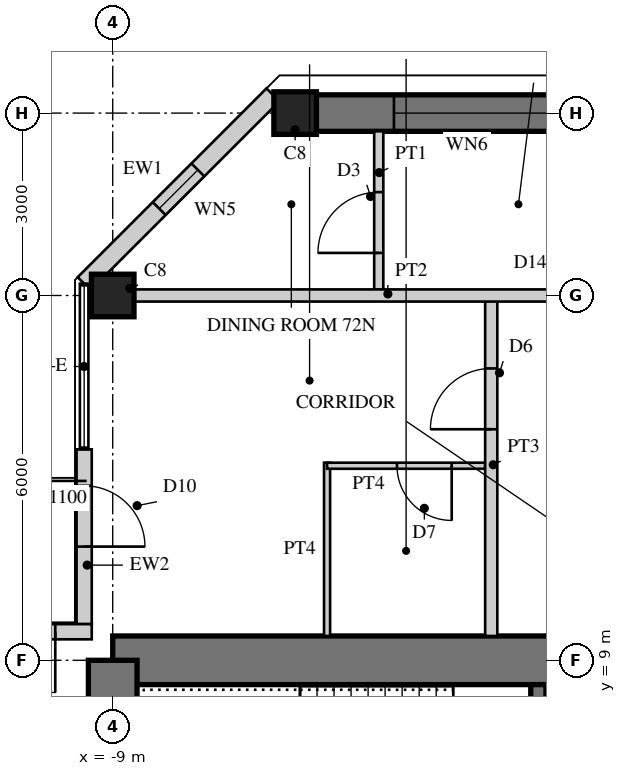
"""IFC4 building model, lengths in metres.
Left out: names, types, materials, properties, quantities, classifications, styles, units other than length and angle.
Written with IfcOpenShell. Run it as: python <this file> out.ifc"""

import sys

from ifc_helpers import new_model, si_unit, direction, frame, frame_2d, origin, origin_2d, place, context, subcontext, project, spatial, rectangle, hollow_rectangle, extrude, element, fill, save


model = new_model("IFC4")
c1 = context("Model", 3, precision=1e-05, world=origin(), true_north=direction((0.0, 1.0)))
c2 = subcontext(c1, "Body", "Model", "MODEL_VIEW")
j1 = project(units=[si_unit("LENGTHUNIT", "METRE"), si_unit("PLANEANGLEUNIT", "RADIAN")], contexts=[c1])
p1 = place(None, origin())
s1 = spatial("IfcSite", under=j1, at=p1, CompositionType="ELEMENT")
p2 = place(p1, origin())
s2 = spatial("IfcBuilding", under=s1, at=p2, CompositionType="ELEMENT")
p3 = place(p2, frame((0.0, 0.0, 278.1)))
s3 = spatial("IfcBuildingStorey", under=s2, at=p3, CompositionType="ELEMENT", Elevation=278.1)
p4 = place(p3, frame((9.0, 9.0, 0.0), z_axis=(0.0, 0.0, 1.0), x_axis=(-1.0, 0.0, 0.0)))
e1 = element("IfcWall", 1, at=p4, inside=s3, PredefinedType="SHEAR", context=c2, shape_type="SweptSolid", body=[
    extrude(rectangle(XDim=18.0, YDim=0.8, at=frame_2d((9.0, 0.0))), origin(), (0.0, 0.0, 1.0), 3.4),
])
p5 = place(p4, frame((9.8, 0.0, 0.0)))
e2 = element("IfcOpeningElement", 2, at=p5, cuts=e1, PredefinedType="OPENING", context=c2, shape_type="SweptSolid", body=[
    extrude(rectangle(XDim=1.0, YDim=2.4, at=frame_2d((0.5, 1.2))), frame((0.0, 0.41, 0.0), z_axis=(0.0, -1.0, 0.0), x_axis=(1.0, 0.0, 0.0)), (0.0, 0.0, 1.0), 0.82),
])
p6 = place(p3, frame((-9.0, 9.0, 0.0), z_axis=(0.0, 0.0, 1.0), x_axis=(0.0, -1.0, 0.0)))
e3 = element("IfcWall", 3, at=p6, inside=s3, PredefinedType="SHEAR", context=c2, shape_type="SweptSolid", body=[
    extrude(rectangle(XDim=18.0, YDim=0.8, at=frame_2d((9.0, 0.0))), origin(), (0.0, 0.0, 1.0), 3.4),
])
p7 = place(p6, frame((9.8, 0.0, 0.0)))
e4 = element("IfcOpeningElement", 4, at=p7, cuts=e3, PredefinedType="OPENING", context=c2, shape_type="SweptSolid", body=[
    extrude(rectangle(XDim=1.0, YDim=2.4, at=frame_2d((0.5, 1.2))), frame((0.0, 0.41, 0.0), z_axis=(0.0, -1.0, 0.0), x_axis=(1.0, 0.0, 0.0)), (0.0, 0.0, 1.0), 0.82),
])
p8 = place(p3, frame((-2.0, 1.675, 0.0), z_axis=(0.0, 0.0, 1.0), x_axis=(0.0, 1.0, 0.0)))
e5 = element("IfcWall", 5, at=p8, inside=s3, PredefinedType="SHEAR", context=c2, shape_type="SweptSolid", body=[
    extrude(rectangle(XDim=6.925, YDim=0.25, at=frame_2d((3.462, 0.0))), origin(), (0.0, 0.0, 1.0), 3.4),
])
p9 = place(p8, frame((0.725, 0.0, 0.0)))
e6 = element("IfcOpeningElement", 6, at=p9, cuts=e5, PredefinedType="OPENING", context=c2, shape_type="SweptSolid", body=[
    extrude(rectangle(XDim=1.0, YDim=2.1, at=frame_2d((0.5, 1.05))), frame((0.0, 0.135, 0.0), z_axis=(0.0, -1.0, 0.0), x_axis=(1.0, 0.0, 0.0)), (0.0, 0.0, 1.0), 0.27),
])
p10 = place(p3, frame((6.0, 18.0, 0.0), z_axis=(0.0, 0.0, 1.0), x_axis=(-1.0, 0.0, 0.0)))
e7 = element("IfcWall", 7, at=p10, inside=s3, PredefinedType="SHEAR", context=c2, shape_type="SweptSolid", body=[
    extrude(rectangle(XDim=12.0, YDim=0.6, at=frame_2d((6.0, 0.0))), origin(), (0.0, 0.0, 1.0), 3.4),
])
p11 = place(p10, frame((1.625, 0.0, 0.6)))
e8 = element("IfcOpeningElement", 8, at=p11, cuts=e7, PredefinedType="OPENING", context=c2, shape_type="SweptSolid", body=[
    extrude(rectangle(XDim=3.0, YDim=2.4, at=frame_2d((1.5, 1.2))), frame((0.0, 0.31, 0.0), z_axis=(0.0, -1.0, 0.0), x_axis=(1.0, 0.0, 0.0)), (0.0, 0.0, 1.0), 0.62),
])
p12 = place(p10, frame((7.375, 0.0, 0.6)))
e9 = element("IfcOpeningElement", 9, at=p12, cuts=e7, PredefinedType="OPENING", context=c2, shape_type="SweptSolid", body=[
    extrude(rectangle(XDim=3.0, YDim=2.4, at=frame_2d((1.5, 1.2))), frame((0.0, 0.31, 0.0), z_axis=(0.0, -1.0, 0.0), x_axis=(1.0, 0.0, 0.0)), (0.0, 0.0, 1.0), 0.62),
])
for number, where, z_axis, x_axis in (
    (10, (-9.0, 15.0, 0.0), (0.0, 0.0, 1.0), (1.0, 0.0, 0.0)),
    (11, (-6.0, 18.0, 0.0), (0.0, 0.0, 1.0), (1.0, 0.0, 0.0)),
):
    element("IfcColumn", number, at=place(p3, frame(where, z_axis=z_axis, x_axis=x_axis)), inside=s3, PredefinedType="COLUMN", context=c2, shape_type="SweptSolid", body=[
        extrude(rectangle(XDim=0.7, YDim=0.7, at=origin_2d()), origin(), (0.0, 0.0, 1.0), 3.4),
    ])
p13 = place(p3, frame((-6.365, 18.3, 0.0), z_axis=(0.0, 0.0, 1.0), x_axis=(-0.70707898447, -0.707134576811, 0.0)))
e12 = element("IfcWall", 12, at=p13, inside=s3, PredefinedType="SOLIDWALL", context=c2, shape_type="SweptSolid", body=[
    extrude(rectangle(XDim=4.392, YDim=0.3, at=frame_2d((2.196, 0.0))), origin(), (0.0, 0.0, 1.0), 3.22),
])
p14 = place(p13, frame((1.746, 0.0, 0.3)))
e13 = element("IfcOpeningElement", 13, at=p14, cuts=e12, PredefinedType="OPENING", context=c2, shape_type="SweptSolid", body=[
    extrude(rectangle(XDim=0.9, YDim=2.4, at=frame_2d((0.45, 1.2))), frame((0.0, 0.16, 0.0), z_axis=(0.0, -1.0, 0.0), x_axis=(1.0, 0.0, 0.0)), (0.0, 0.0, 1.0), 0.32),
])
p15 = place(p3, frame((-9.47, 12.47, 0.0), z_axis=(0.0, 0.0, 1.0), x_axis=(0.0, -1.0, 0.0)))
e14 = element("IfcWall", 14, at=p15, inside=s3, PredefinedType="SOLIDWALL", context=c2, shape_type="SweptSolid", body=[
    extrude(rectangle(XDim=2.875, YDim=0.25, at=frame_2d((1.438, 0.0))), origin(), (0.0, 0.0, 1.0), 3.22),
])
p16 = place(p15, frame((0.6, 0.0, 0.0)))
e15 = element("IfcOpeningElement", 15, at=p16, cuts=e14, PredefinedType="OPENING", context=c2, shape_type="SweptSolid", body=[
    extrude(rectangle(XDim=1.0, YDim=2.2, at=frame_2d((0.5, 1.1))), frame((0.0, 0.135, 0.0), z_axis=(0.0, -1.0, 0.0), x_axis=(1.0, 0.0, 0.0)), (0.0, 0.0, 1.0), 0.27),
])
p17 = place(p3, frame((-9.345, 9.47, 0.0), z_axis=(0.0, 0.0, 1.0), x_axis=(-1.0, 0.0, 0.0)))
e16 = element("IfcWall", 16, at=p17, inside=s3, PredefinedType="SOLIDWALL", context=c2, shape_type="SweptSolid", body=[
    extrude(rectangle(XDim=3.125, YDim=0.25, at=frame_2d((1.562, 0.0))), origin(), (0.0, 0.0, 1.0), 3.22),
])
p18 = place(p17, frame((0.6, 0.0, 0.0)))
e17 = element("IfcOpeningElement", 17, at=p18, cuts=e16, PredefinedType="OPENING", context=c2, shape_type="SweptSolid", body=[
    extrude(rectangle(XDim=1.0, YDim=2.2, at=frame_2d((0.5, 1.1))), frame((0.0, 0.135, 0.0), z_axis=(0.0, -1.0, 0.0), x_axis=(1.0, 0.0, 0.0)), (0.0, 0.0, 1.0), 0.27),
])
p19 = place(p3, frame((-5.475, 9.4, 0.0), z_axis=(0.0, 0.0, 1.0), x_axis=(0.0, 1.0, 0.0)))
e18 = element("IfcWall", 18, at=p19, inside=s3, PredefinedType="PARTITIONING", context=c2, shape_type="SweptSolid", body=[
    extrude(rectangle(XDim=2.85, YDim=0.1, at=frame_2d((1.425, 0.0))), origin(), (0.0, 0.0, 1.0), 3.22),
])
p20 = place(p3, frame((-2.875, 12.2, 0.0), z_axis=(0.0, 0.0, 1.0), x_axis=(-1.0, 0.0, 0.0)))
e19 = element("IfcWall", 19, at=p20, inside=s3, PredefinedType="PARTITIONING", context=c2, shape_type="SweptSolid", body=[
    extrude(rectangle(XDim=2.6, YDim=0.1, at=frame_2d((1.3, 0.0))), origin(), (0.0, 0.0, 1.0), 3.22),
])
p21 = place(p20, frame((0.55, 0.0, 0.0)))
e20 = element("IfcOpeningElement", 20, at=p21, cuts=e19, PredefinedType="OPENING", context=c2, shape_type="SweptSolid", body=[
    extrude(rectangle(XDim=0.9, YDim=2.1, at=frame_2d((0.45, 1.05))), frame((0.0, 0.06, 0.0), z_axis=(0.0, -1.0, 0.0), x_axis=(1.0, 0.0, 0.0)), (0.0, 0.0, 1.0), 0.12),
])
p22 = place(p3, frame((-2.775, 9.4, 0.0), z_axis=(0.0, 0.0, 1.0), x_axis=(0.0, 1.0, 0.0)))
e21 = element("IfcWall", 21, at=p22, inside=s3, PredefinedType="SOLIDWALL", context=c2, shape_type="SweptSolid", body=[
    extrude(rectangle(XDim=5.6, YDim=0.2, at=frame_2d((2.8, 0.0))), origin(), (0.0, 0.0, 1.0), 3.22),
])
p23 = place(p22, frame((3.4, 0.0, 0.0)))
e22 = element("IfcOpeningElement", 22, at=p23, cuts=e21, PredefinedType="OPENING", context=c2, shape_type="SweptSolid", body=[
    extrude(rectangle(XDim=1.0, YDim=2.15, at=frame_2d((0.5, 1.075))), frame((0.0, 0.11, 0.0), z_axis=(0.0, -1.0, 0.0), x_axis=(1.0, 0.0, 0.0)), (0.0, 0.0, 1.0), 0.22),
])
p24 = place(p3, frame((-4.625, 15.1, 0.0), z_axis=(0.0, 0.0, 1.0), x_axis=(0.0, 1.0, 0.0)))
e23 = element("IfcWall", 23, at=p24, inside=s3, PredefinedType="PARTITIONING", context=c2, shape_type="SweptSolid", body=[
    extrude(rectangle(XDim=2.6, YDim=0.15, at=frame_2d((1.3, 0.0))), origin(), (0.0, 0.0, 1.0), 3.22),
])
p25 = place(p24, frame((0.6, 0.0, 0.0)))
e24 = element("IfcOpeningElement", 24, at=p25, cuts=e23, PredefinedType="OPENING", context=c2, shape_type="SweptSolid", body=[
    extrude(rectangle(XDim=1.0, YDim=2.1, at=frame_2d((0.5, 1.05))), frame((0.0, 0.085, 0.0), z_axis=(0.0, -1.0, 0.0), x_axis=(1.0, 0.0, 0.0)), (0.0, 0.0, 1.0), 0.17),
])
p26 = place(p3, frame((-0.3, 15.0, 0.0), z_axis=(0.0, 0.0, 1.0), x_axis=(-1.0, 0.0, 0.0)))
e25 = element("IfcWall", 25, at=p26, inside=s3, PredefinedType="SOLIDWALL", context=c2, shape_type="SweptSolid", body=[
    extrude(rectangle(XDim=8.35, YDim=0.2, at=frame_2d((4.175, 0.0))), origin(), (0.0, 0.0, 1.0), 2.52),
])
p27 = place(p26, frame((0.4, 0.0, 0.0)))
e26 = element("IfcOpeningElement", 26, at=p27, cuts=e25, PredefinedType="OPENING", context=c2, shape_type="SweptSolid", body=[
    extrude(rectangle(XDim=1.0, YDim=2.2, at=frame_2d((0.5, 1.1))), frame((0.0, 0.11, 0.0), z_axis=(0.0, -1.0, 0.0), x_axis=(1.0, 0.0, 0.0)), (0.0, 0.0, 1.0), 0.22),
])
p28 = place(p12, origin())
e27 = element("IfcWindow", 27, at=p28, inside=s3, PartitioningType="SINGLE_PANEL", PredefinedType="WINDOW", context=c2, shape_type="SweptSolid", body=[
    extrude(hollow_rectangle(XDim=3.0, YDim=2.4, WallThickness=0.06, at=frame_2d((1.5, 1.2))), frame((0.0, 0.03, 0.0), z_axis=(0.0, -1.0, 0.0), x_axis=(1.0, 0.0, 0.0)), (0.0, 0.0, 1.0), 0.06),
    extrude(rectangle(XDim=2.879, YDim=2.279, at=frame_2d((1.5, 1.2))), frame((0.0, 0.03, 0.0), z_axis=(0.0, -1.0, 0.0), x_axis=(1.0, 0.0, 0.0)), (0.0, 0.0, 1.0), 0.06),
])
fill(e9, e27)
p29 = place(p14, origin())
e28 = element("IfcWindow", 28, at=p29, inside=s3, PartitioningType="SINGLE_PANEL", PredefinedType="WINDOW", context=c2, shape_type="SweptSolid", body=[
    extrude(hollow_rectangle(XDim=0.9, YDim=2.4, WallThickness=0.06, at=frame_2d((0.45, 1.2))), frame((0.0, 0.03, 0.0), z_axis=(0.0, -1.0, 0.0), x_axis=(1.0, 0.0, 0.0)), (0.0, 0.0, 1.0), 0.06),
    extrude(rectangle(XDim=0.779, YDim=2.279, at=frame_2d((0.45, 1.2))), frame((0.0, 0.03, 0.0), z_axis=(0.0, -1.0, 0.0), x_axis=(1.0, 0.0, 0.0)), (0.0, 0.0, 1.0), 0.06),
])
fill(e13, e28)
p30 = place(p16, origin())
e29 = element("IfcDoor", 29, at=p30, inside=s3, OperationType="SINGLE_SWING_RIGHT", PredefinedType="DOOR", context=c2, shape_type="SweptSolid", body=[
    extrude(hollow_rectangle(XDim=1.0, YDim=2.2, WallThickness=0.06, at=frame_2d((0.5, 1.1))), frame((0.0, 0.025, 0.0), z_axis=(0.0, -1.0, 0.0), x_axis=(1.0, 0.0, 0.0)), (0.0, 0.0, 1.0), 0.05),
    extrude(rectangle(XDim=0.879, YDim=2.079, at=frame_2d((0.5, 1.1))), frame((0.0, 0.025, 0.0), z_axis=(0.0, -1.0, 0.0), x_axis=(1.0, 0.0, 0.0)), (0.0, 0.0, 1.0), 0.05),
])
fill(e15, e29)
p31 = place(p18, origin())
e30 = element("IfcDoor", 30, at=p31, inside=s3, OperationType="SINGLE_SWING_LEFT", PredefinedType="DOOR", context=c2, shape_type="SweptSolid", body=[
    extrude(hollow_rectangle(XDim=1.0, YDim=2.2, WallThickness=0.06, at=frame_2d((0.5, 1.1))), frame((0.0, 0.025, 0.0), z_axis=(0.0, -1.0, 0.0), x_axis=(1.0, 0.0, 0.0)), (0.0, 0.0, 1.0), 0.05),
    extrude(rectangle(XDim=0.879, YDim=2.079, at=frame_2d((0.5, 1.1))), frame((0.0, 0.025, 0.0), z_axis=(0.0, -1.0, 0.0), x_axis=(1.0, 0.0, 0.0)), (0.0, 0.0, 1.0), 0.05),
])
fill(e17, e30)
p32 = place(p21, origin())
e31 = element("IfcDoor", 31, at=p32, inside=s3, OperationType="SINGLE_SWING_LEFT", PredefinedType="DOOR", context=c2, shape_type="SweptSolid", body=[
    extrude(rectangle(XDim=0.9, YDim=2.1, at=frame_2d((0.45, 1.05))), frame((0.0, 0.025, 0.0), z_axis=(0.0, -1.0, 0.0), x_axis=(1.0, 0.0, 0.0)), (0.0, 0.0, 1.0), 0.05),
])
fill(e20, e31)
p33 = place(p23, origin())
e32 = element("IfcDoor", 32, at=p33, inside=s3, OperationType="SINGLE_SWING_LEFT", PredefinedType="DOOR", context=c2, shape_type="SweptSolid", body=[
    extrude(rectangle(XDim=1.0, YDim=2.15, at=frame_2d((0.5, 1.075))), frame((0.0, 0.025, 0.0), z_axis=(0.0, -1.0, 0.0), x_axis=(1.0, 0.0, 0.0)), (0.0, 0.0, 1.0), 0.05),
])
fill(e22, e32)
p34 = place(p25, origin())
e33 = element("IfcDoor", 33, at=p34, inside=s3, OperationType="SINGLE_SWING_LEFT", PredefinedType="DOOR", context=c2, shape_type="SweptSolid", body=[
    extrude(rectangle(XDim=1.0, YDim=2.1, at=frame_2d((0.5, 1.05))), frame((0.0, 0.025, 0.0), z_axis=(0.0, -1.0, 0.0), x_axis=(1.0, 0.0, 0.0)), (0.0, 0.0, 1.0), 0.05),
])
fill(e24, e33)
save(model, sys.argv[1])
